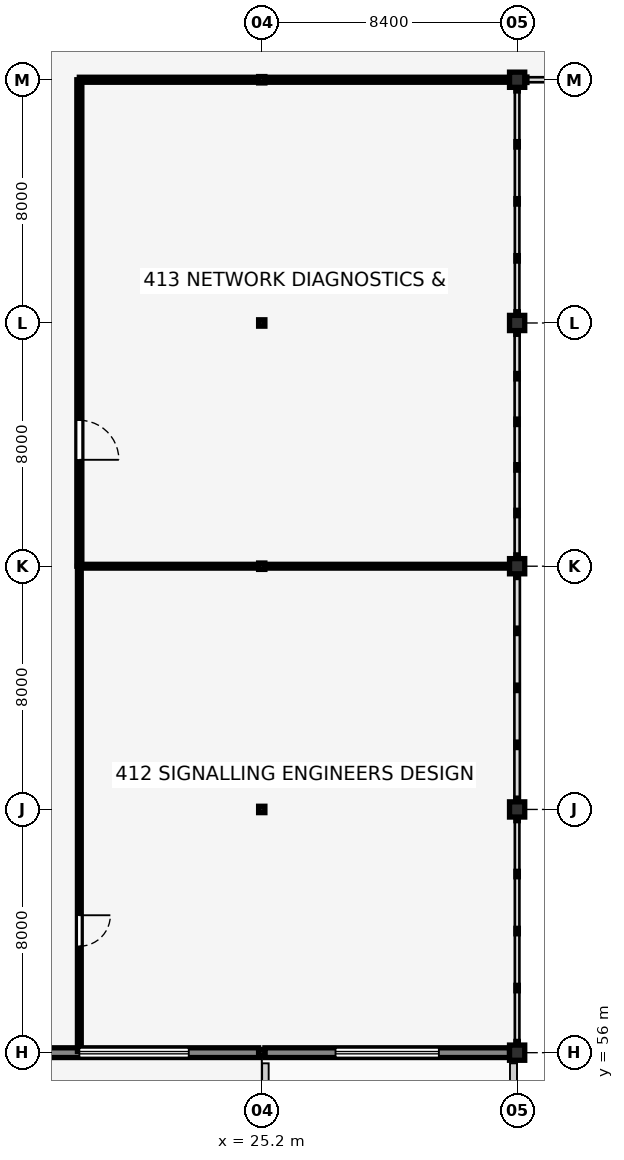
"""IFC4 building model, lengths in metres.
Left out: names, types, materials, properties, quantities, classifications, styles, units other than length and angle.
Written with IfcOpenShell. Run it as: python <this file> out.ifc"""

import sys

from ifc_helpers import new_model, si_unit, direction, frame, frame_2d, origin, origin_2d, place, context, subcontext, project, spatial, rectangle, i_section, extrude, element, fill, save


model = new_model("IFC4")
c1 = context("Model", 3, precision=1e-05, world=origin(), true_north=direction((0.0, 1.0)))
c2 = subcontext(c1, "Body", "Model", "MODEL_VIEW")
j1 = project(units=[si_unit("LENGTHUNIT", "METRE"), si_unit("PLANEANGLEUNIT", "RADIAN")], contexts=[c1])
p1 = place(None, origin())
s1 = spatial("IfcSite", under=j1, at=p1, CompositionType="ELEMENT")
p2 = place(p1, origin())
s2 = spatial("IfcBuilding", under=s1, at=p2, CompositionType="ELEMENT")
p3 = place(p2, frame((0.0, 0.0, 17.2)))
s3 = spatial("IfcBuildingStorey", under=s2, at=p3, CompositionType="ELEMENT", Elevation=17.2)
for number, where, z_axis, x_axis in (
    (1, (25.2, 56.0, 0.0), (0.0, 0.0, 1.0), (1.0, 0.0, 0.0)),
    (2, (25.2, 64.0, 0.0), (0.0, 0.0, 1.0), (1.0, 0.0, 0.0)),
    (3, (25.2, 72.0, 0.0), (0.0, 0.0, 1.0), (1.0, 0.0, 0.0)),
    (4, (25.2, 80.0, 0.0), (0.0, 0.0, 1.0), (1.0, 0.0, 0.0)),
    (5, (25.2, 88.0, 0.0), (0.0, 0.0, 1.0), (1.0, 0.0, 0.0)),
):
    element("IfcColumn", number, at=place(p3, frame(where, z_axis=z_axis, x_axis=x_axis)), inside=s3, PredefinedType="COLUMN", context=c2, shape_type="SweptSolid", body=[
        extrude(i_section(OverallWidth=0.206, OverallDepth=0.21, WebThickness=0.01, FlangeThickness=0.014, FilletRadius=0.01, at=origin_2d()), origin(), (0.0, 0.0, 1.0), 3.59),
    ])
for number, where, z_axis, x_axis in (
    (6, (33.6, 56.0, 0.0), (0.0, 0.0, 1.0), (1.0, 0.0, 0.0)),
    (7, (33.6, 64.0, 0.0), (0.0, 0.0, 1.0), (1.0, 0.0, 0.0)),
    (8, (33.6, 72.0, 0.0), (0.0, 0.0, 1.0), (1.0, 0.0, 0.0)),
    (9, (33.6, 80.0, 0.0), (0.0, 0.0, 1.0), (1.0, 0.0, 0.0)),
    (10, (33.6, 88.0, 0.0), (0.0, 0.0, 1.0), (1.0, 0.0, 0.0)),
):
    element("IfcColumn", number, at=place(p3, frame(where, z_axis=z_axis, x_axis=x_axis)), inside=s3, PredefinedType="COLUMN", context=c2, shape_type="SweptSolid", body=[
        extrude(rectangle(XDim=0.5, YDim=0.5, at=origin_2d()), origin(), (0.0, 0.0, 1.0), 3.59),
    ])
p4 = place(p3, frame((16.903, 56.0, 0.0), z_axis=(0.0, 0.0, 1.0), x_axis=(1.0, 0.0, 0.0)))
e11 = element("IfcWall", 11, at=p4, inside=s3, PredefinedType="SOLIDWALL", context=c2, shape_type="SweptSolid", body=[
    extrude(rectangle(XDim=8.194, YDim=0.32, at=frame_2d((4.097, 0.0))), origin(), (0.0, 0.0, 1.0), 3.33),
])
p5 = place(p4, frame((2.297, 0.0, 0.9), z_axis=(0.0, 0.0, 1.0), x_axis=(1.0, 0.0, 0.0)))
e12 = element("IfcOpeningElement", 12, at=p5, cuts=e11, PredefinedType="OPENING", context=c2, shape_type="SweptSolid", body=[
    extrude(rectangle(XDim=3.6, YDim=1.8, at=frame_2d((1.8, 0.9))), frame((0.0, 0.17, 0.0), z_axis=(0.0, -1.0, 0.0), x_axis=(1.0, 0.0, 0.0)), (0.0, 0.0, 1.0), 0.34),
])
p6 = place(p3, frame((25.303, 56.0, 0.0), z_axis=(0.0, 0.0, 1.0), x_axis=(1.0, 0.0, 0.0)))
e13 = element("IfcWall", 13, at=p6, inside=s3, PredefinedType="SOLIDWALL", context=c2, shape_type="SweptSolid", body=[
    extrude(rectangle(XDim=8.047, YDim=0.32, at=frame_2d((4.023, 0.0))), origin(), (0.0, 0.0, 1.0), 3.33),
])
p7 = place(p6, frame((2.323, 0.0, 0.9), z_axis=(0.0, 0.0, 1.0), x_axis=(1.0, 0.0, 0.0)))
e14 = element("IfcOpeningElement", 14, at=p7, cuts=e13, PredefinedType="OPENING", context=c2, shape_type="SweptSolid", body=[
    extrude(rectangle(XDim=3.4, YDim=1.7, at=frame_2d((1.7, 0.85))), frame((0.0, 0.17, 0.0), z_axis=(0.0, -1.0, 0.0), x_axis=(1.0, 0.0, 0.0)), (0.0, 0.0, 1.0), 0.34),
])
p8 = place(p3, frame((25.32, 48.12, 0.0), z_axis=(0.0, 0.0, 1.0), x_axis=(0.0, 1.0, 0.0)))
e15 = element("IfcWall", 15, at=p8, inside=s3, PredefinedType="PARAPET", context=c2, shape_type="SweptSolid", body=[
    extrude(rectangle(XDim=7.53, YDim=0.215, at=frame_2d((3.765, 0.0))), origin(), (0.0, 0.0, 1.0), 1.05),
])
p9 = place(p3, frame((33.48, 55.65, 0.0), z_axis=(0.0, 0.0, 1.0), x_axis=(0.0, -1.0, 0.0)))
e16 = element("IfcWall", 16, at=p9, inside=s3, PredefinedType="PARAPET", context=c2, shape_type="SweptSolid", body=[
    extrude(rectangle(XDim=7.53, YDim=0.23, at=frame_2d((3.765, 0.0))), origin(), (0.0, 0.0, 1.0), 1.05),
])
p10 = place(p3, frame((19.2, 56.04, 0.0), z_axis=(0.0, 0.0, 1.0), x_axis=(0.0, 1.0, 0.0)))
e17 = element("IfcWall", 17, at=p10, inside=s3, PredefinedType="PARTITIONING", context=c2, shape_type="SweptSolid", body=[
    extrude(rectangle(XDim=15.96, YDim=0.125, at=frame_2d((7.98, 0.0))), origin(), (0.0, 0.0, 1.0), 3.59),
])
p11 = place(p10, frame((4.48, 0.0, 0.0), z_axis=(0.0, 0.0, 1.0), x_axis=(-1.0, 0.0, 0.0)))
e18 = element("IfcOpeningElement", 18, at=p11, cuts=e17, PredefinedType="OPENING", context=c2, shape_type="SweptSolid", body=[
    extrude(rectangle(XDim=1.02, YDim=2.16, at=frame_2d((0.51, 1.08))), frame((0.0, 0.073, 0.0), z_axis=(0.0, -1.0, 0.0), x_axis=(1.0, 0.0, 0.0)), (0.0, 0.0, 1.0), 0.145),
])
p12 = place(p3, frame((19.2, 72.0, 0.0), z_axis=(0.0, 0.0, 1.0), x_axis=(0.0, 1.0, 0.0)))
e19 = element("IfcWall", 19, at=p12, inside=s3, PredefinedType="PARTITIONING", context=c2, shape_type="SweptSolid", body=[
    extrude(rectangle(XDim=16.0, YDim=0.165, at=frame_2d((8.0, 0.0))), origin(), (0.0, 0.0, 1.0), 3.59),
])
p13 = place(p12, frame((4.8, 0.0, 0.0), z_axis=(0.0, 0.0, 1.0), x_axis=(-1.0, 0.0, 0.0)))
e20 = element("IfcOpeningElement", 20, at=p13, cuts=e19, PredefinedType="OPENING", context=c2, shape_type="SweptSolid", body=[
    extrude(rectangle(XDim=1.3, YDim=2.25, at=frame_2d((0.65, 1.125))), frame((0.0, 0.093, 0.0), z_axis=(0.0, -1.0, 0.0), x_axis=(1.0, 0.0, 0.0)), (0.0, 0.0, 1.0), 0.185),
])
p14 = place(p3, frame((19.2, 72.0, 0.0), z_axis=(0.0, 0.0, 1.0), x_axis=(1.0, 0.0, 0.0)))
e21 = element("IfcWall", 21, at=p14, inside=s3, PredefinedType="PARTITIONING", context=c2, shape_type="SweptSolid", body=[
    extrude(rectangle(XDim=5.907, YDim=0.125, at=frame_2d((2.954, 0.0))), origin(), (0.0, 0.0, 1.0), 3.137),
])
p15 = place(p3, frame((25.293, 72.0, 0.0), z_axis=(0.0, 0.0, 1.0), x_axis=(1.0, 0.0, 0.0)))
e22 = element("IfcWall", 22, at=p15, inside=s3, PredefinedType="PARTITIONING", context=c2, shape_type="SweptSolid", body=[
    extrude(rectangle(XDim=8.067, YDim=0.125, at=frame_2d((4.034, 0.0))), origin(), (0.0, 0.0, 1.0), 3.137),
])
p16 = place(p3, frame((19.2, 88.0, 0.0), z_axis=(0.0, 0.0, 1.0), x_axis=(1.0, 0.0, 0.0)))
e23 = element("IfcWall", 23, at=p16, inside=s3, PredefinedType="PARTITIONING", context=c2, shape_type="SweptSolid", body=[
    extrude(rectangle(XDim=5.907, YDim=0.165, at=frame_2d((2.954, 0.0))), origin(), (0.0, 0.0, 1.0), 3.137),
])
p17 = place(p3, frame((25.293, 88.0, 0.0), z_axis=(0.0, 0.0, 1.0), x_axis=(1.0, 0.0, 0.0)))
e24 = element("IfcWall", 24, at=p17, inside=s3, PredefinedType="PARTITIONING", context=c2, shape_type="SweptSolid", body=[
    extrude(rectangle(XDim=8.067, YDim=0.165, at=frame_2d((4.034, 0.0))), origin(), (0.0, 0.0, 1.0), 3.137),
])
p18 = place(p5, origin())
e25 = element("IfcWindow", 25, at=p18, inside=s3, PartitioningType="TRIPLE_PANEL_VERTICAL", PredefinedType="WINDOW", context=c2, shape_type="SweptSolid", body=[
    extrude(rectangle(XDim=3.6, YDim=1.8, at=frame_2d((1.8, 0.9))), frame((0.0, 0.03, 0.0), z_axis=(0.0, -1.0, 0.0), x_axis=(1.0, 0.0, 0.0)), (0.0, 0.0, 1.0), 0.06),
])
fill(e12, e25)
p19 = place(p7, origin())
e26 = element("IfcWindow", 26, at=p19, inside=s3, PartitioningType="TRIPLE_PANEL_VERTICAL", PredefinedType="WINDOW", context=c2, shape_type="SweptSolid", body=[
    extrude(rectangle(XDim=3.4, YDim=1.7, at=frame_2d((1.7, 0.85))), frame((0.0, 0.03, 0.0), z_axis=(0.0, -1.0, 0.0), x_axis=(1.0, 0.0, 0.0)), (0.0, 0.0, 1.0), 0.06),
])
fill(e14, e26)
p20 = place(p11, origin())
e27 = element("IfcDoor", 27, at=p20, inside=s3, OperationType="SINGLE_SWING_LEFT", PredefinedType="DOOR", context=c2, shape_type="SweptSolid", body=[
    extrude(rectangle(XDim=1.02, YDim=2.16, at=frame_2d((0.51, 1.08))), frame((0.0, 0.025, 0.0), z_axis=(0.0, -1.0, 0.0), x_axis=(1.0, 0.0, 0.0)), (0.0, 0.0, 1.0), 0.05),
])
fill(e18, e27)
p21 = place(p13, origin())
e28 = element("IfcDoor", 28, at=p21, inside=s3, OperationType="SINGLE_SWING_RIGHT", PredefinedType="DOOR", context=c2, shape_type="SweptSolid", body=[
    extrude(rectangle(XDim=1.3, YDim=2.25, at=frame_2d((0.65, 1.125))), frame((0.0, 0.025, 0.0), z_axis=(0.0, -1.0, 0.0), x_axis=(1.0, 0.0, 0.0)), (0.0, 0.0, 1.0), 0.05),
])
fill(e20, e28)
save(model, sys.argv[1])
